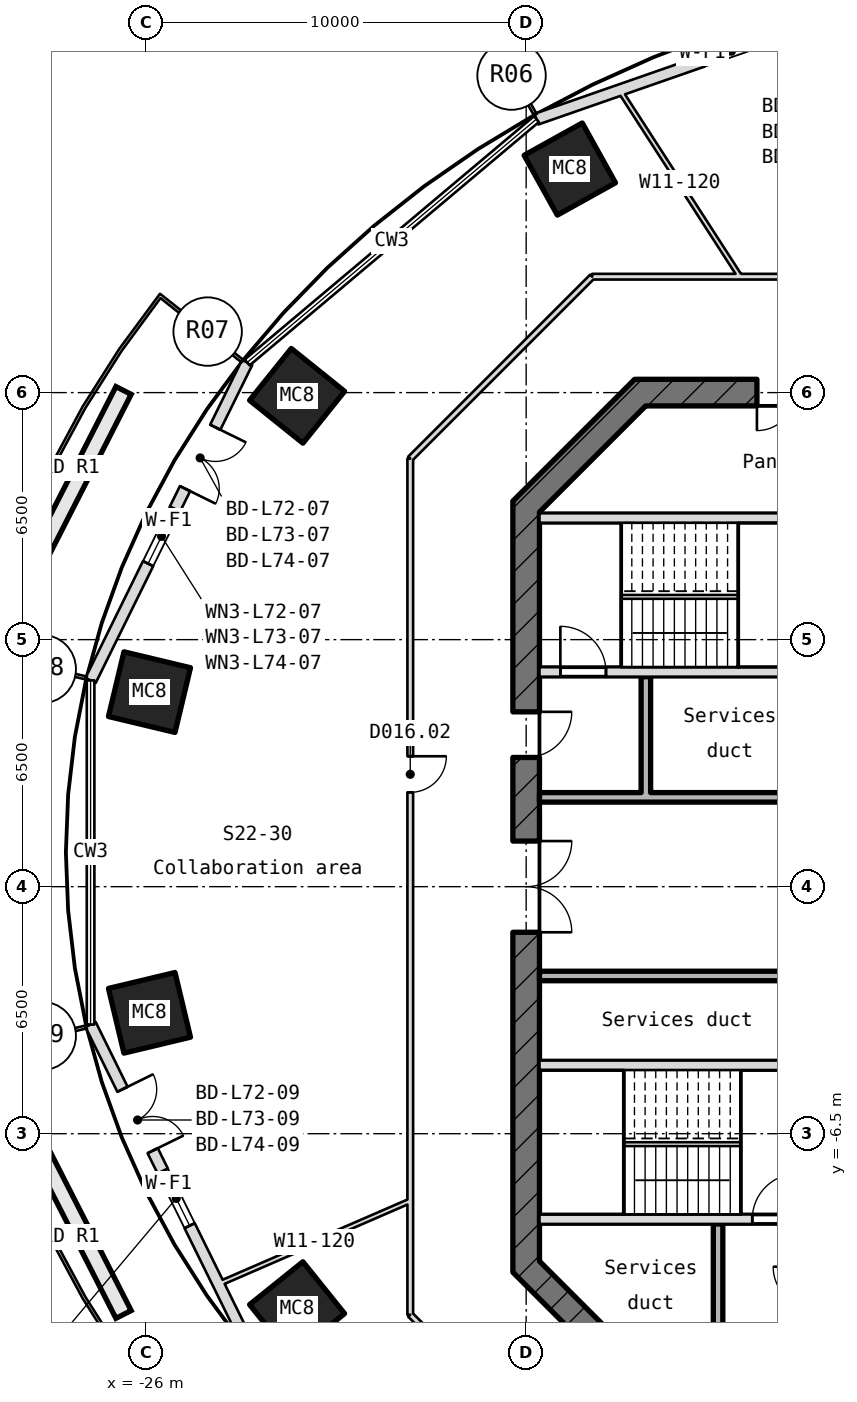
"""IFC4 building model, lengths in metres.
Left out: names, types, materials, properties, quantities, classifications, styles, units other than length and angle.
Written with IfcOpenShell. Run it as: python <this file> out.ifc"""

import sys

from ifc_helpers import new_model, si_unit, direction, frame, frame_2d, origin, origin_2d, place, context, subcontext, project, spatial, rectangle, hollow_rectangle, extrude, element, fill, save


model = new_model("IFC4")
c1 = context("Model", 3, precision=1e-05, world=origin(), true_north=direction((0.0, 1.0)))
c2 = subcontext(c1, "Body", "Model", "MODEL_VIEW")
j1 = project(units=[si_unit("LENGTHUNIT", "METRE"), si_unit("PLANEANGLEUNIT", "RADIAN")], contexts=[c1])
p1 = place(None, origin())
s1 = spatial("IfcSite", under=j1, at=p1, CompositionType="ELEMENT")
p2 = place(p1, origin())
s2 = spatial("IfcBuilding", under=s1, at=p2, CompositionType="ELEMENT")
p3 = place(p2, frame((0.0, 0.0, 321.85)))
s3 = spatial("IfcBuildingStorey", under=s2, at=p3, CompositionType="ELEMENT", Elevation=321.85)
for number, where, z_axis, x_axis in (
    (1, (-14.852, 18.882, -0.18), (0.0, 0.0, 1.0), (0.874, 0.486, 0.0)),
    (2, (-22.028, 12.915, -0.18), (0.0, 0.0, 1.0), (0.626, 0.779, 0.0)),
    (3, (-25.912, 5.119, -0.18), (0.0, 0.0, 1.0), (0.233, 0.973, 0.0)),
    (4, (-25.912, -3.319, -0.18), (0.0, 0.0, 1.0), (-0.233, 0.973, 0.0)),
    (5, (-22.028, -11.115, -0.18), (0.0, 0.0, 1.0), (-0.626, 0.779, 0.0)),
):
    element("IfcColumn", number, at=place(p3, frame(where, z_axis=z_axis, x_axis=x_axis)), inside=s3, PredefinedType="COLUMN", context=c2, shape_type="SweptSolid", body=[
        extrude(hollow_rectangle(XDim=1.75, YDim=1.8, WallThickness=0.055, at=origin_2d()), origin(), (0.0, 0.0, 1.0), 4.15),
    ])
p4 = place(p3, frame((-5.783, 23.661, 0.0), z_axis=(0.0, 0.0, 1.0), x_axis=(-0.944327184146, -0.329007855959, 0.0)))
e6 = element("IfcWall", 6, at=p4, inside=s3, PredefinedType="SOLIDWALL", context=c2, shape_type="SweptSolid", body=[
    extrude(rectangle(XDim=10.533, YDim=0.3, at=frame_2d((5.266, 0.0))), origin(), (0.0, 0.0, 1.0), 3.97),
])
p5 = place(p4, frame((1.9, 0.0, 0.0)))
e7 = element("IfcOpeningElement", 7, at=p5, cuts=e6, PredefinedType="OPENING", context=c2, shape_type="SweptSolid", body=[
    extrude(rectangle(XDim=1.8, YDim=2.4, at=frame_2d((0.9, 1.2))), frame((0.0, 0.16, 0.0), z_axis=(0.0, -1.0, 0.0), x_axis=(1.0, 0.0, 0.0)), (0.0, 0.0, 1.0), 0.32),
])
p6 = place(p4, frame((4.3, 0.0, 0.9)))
e8 = element("IfcOpeningElement", 8, at=p6, cuts=e6, PredefinedType="OPENING", context=c2, shape_type="SweptSolid", body=[
    extrude(rectangle(XDim=1.6, YDim=1.5, at=frame_2d((0.8, 0.75))), frame((0.0, 0.16, 0.0), z_axis=(0.0, -1.0, 0.0), x_axis=(1.0, 0.0, 0.0)), (0.0, 0.0, 1.0), 0.32),
])
p7 = place(p3, frame((-23.342, 13.793, 0.0), z_axis=(0.0, 0.0, 1.0), x_axis=(-0.441822778199, -0.897102353505, 0.0)))
e9 = element("IfcWall", 9, at=p7, inside=s3, PredefinedType="SOLIDWALL", context=c2, shape_type="SweptSolid", body=[
    extrude(rectangle(XDim=9.325, YDim=0.3, at=frame_2d((4.663, 0.0))), origin(), (0.0, 0.0, 1.0), 3.97),
])
p8 = place(p7, frame((1.9, 0.0, 0.0)))
e10 = element("IfcOpeningElement", 10, at=p8, cuts=e9, PredefinedType="OPENING", context=c2, shape_type="SweptSolid", body=[
    extrude(rectangle(XDim=1.8, YDim=2.4, at=frame_2d((0.9, 1.2))), frame((0.0, 0.16, 0.0), z_axis=(0.0, -1.0, 0.0), x_axis=(1.0, 0.0, 0.0)), (0.0, 0.0, 1.0), 0.32),
])
p9 = place(p7, frame((4.3, 0.0, 0.9)))
e11 = element("IfcOpeningElement", 11, at=p9, cuts=e9, PredefinedType="OPENING", context=c2, shape_type="SweptSolid", body=[
    extrude(rectangle(XDim=1.6, YDim=1.5, at=frame_2d((0.8, 0.75))), frame((0.0, 0.16, 0.0), z_axis=(0.0, -1.0, 0.0), x_axis=(1.0, 0.0, 0.0)), (0.0, 0.0, 1.0), 0.32),
])
p10 = place(p3, frame((-27.462, -3.627, 0.0), z_axis=(0.0, 0.0, 1.0), x_axis=(0.441822778199, -0.897102353505, 0.0)))
e12 = element("IfcWall", 12, at=p10, inside=s3, PredefinedType="SOLIDWALL", context=c2, shape_type="SweptSolid", body=[
    extrude(rectangle(XDim=9.325, YDim=0.3, at=frame_2d((4.663, 0.0))), origin(), (0.0, 0.0, 1.0), 3.97),
])
p11 = place(p10, frame((1.9, 0.0, 0.0)))
e13 = element("IfcOpeningElement", 13, at=p11, cuts=e12, PredefinedType="OPENING", context=c2, shape_type="SweptSolid", body=[
    extrude(rectangle(XDim=1.8, YDim=2.4, at=frame_2d((0.9, 1.2))), frame((0.0, 0.16, 0.0), z_axis=(0.0, -1.0, 0.0), x_axis=(1.0, 0.0, 0.0)), (0.0, 0.0, 1.0), 0.32),
])
p12 = place(p10, frame((4.3, 0.0, 0.9)))
e14 = element("IfcOpeningElement", 14, at=p12, cuts=e12, PredefinedType="OPENING", context=c2, shape_type="SweptSolid", body=[
    extrude(rectangle(XDim=1.6, YDim=1.5, at=frame_2d((0.8, 0.75))), frame((0.0, 0.16, 0.0), z_axis=(0.0, -1.0, 0.0), x_axis=(1.0, 0.0, 0.0)), (0.0, 0.0, 1.0), 0.32),
])
p13 = place(p3, frame((13.145, 13.0, -0.18), z_axis=(0.0, 0.0, 1.0), x_axis=(-1.0, 0.0, 0.0)))
e15 = element("IfcWall", 15, at=p13, inside=s3, PredefinedType="SHEAR", context=c2, shape_type="SweptSolid", body=[
    extrude(rectangle(XDim=26.29, YDim=0.7, at=frame_2d((13.145, 0.0))), origin(), (0.0, 0.0, 1.0), 4.15),
])
p14 = place(p13, frame((22.073, 0.0, 0.18)))
e16 = element("IfcOpeningElement", 16, at=p14, cuts=e15, PredefinedType="OPENING", context=c2, shape_type="SweptSolid", body=[
    extrude(rectangle(XDim=1.0, YDim=2.1, at=frame_2d((0.5, 1.05))), frame((0.0, 0.36, 0.0), z_axis=(0.0, -1.0, 0.0), x_axis=(1.0, 0.0, 0.0)), (0.0, 0.0, 1.0), 0.72),
])
p15 = place(p13, frame((15.395, 0.0, 0.18)))
e17 = element("IfcOpeningElement", 17, at=p15, cuts=e15, PredefinedType="OPENING", context=c2, shape_type="SweptSolid", body=[
    extrude(rectangle(XDim=1.0, YDim=2.1, at=frame_2d((0.5, 1.05))), frame((0.0, 0.36, 0.0), z_axis=(0.0, -1.0, 0.0), x_axis=(1.0, 0.0, 0.0)), (0.0, 0.0, 1.0), 0.72),
])
p16 = place(p13, frame((7.895, 0.0, 0.18)))
e18 = element("IfcOpeningElement", 18, at=p16, cuts=e15, PredefinedType="OPENING", context=c2, shape_type="SweptSolid", body=[
    extrude(rectangle(XDim=1.0, YDim=2.1, at=frame_2d((0.5, 1.05))), frame((0.0, 0.36, 0.0), z_axis=(0.0, -1.0, 0.0), x_axis=(1.0, 0.0, 0.0)), (0.0, 0.0, 1.0), 0.72),
])
p17 = place(p13, frame((2.4, 0.0, 0.18)))
e19 = element("IfcOpeningElement", 19, at=p17, cuts=e15, PredefinedType="OPENING", context=c2, shape_type="SweptSolid", body=[
    extrude(rectangle(XDim=1.0, YDim=2.1, at=frame_2d((0.5, 1.05))), frame((0.0, 0.36, 0.0), z_axis=(0.0, -1.0, 0.0), x_axis=(1.0, 0.0, 0.0)), (0.0, 0.0, 1.0), 0.72),
])
p18 = place(p3, frame((-12.897, 13.103, -0.18), z_axis=(0.0, 0.0, 1.0), x_axis=(-0.707106781187, -0.707106781187, 0.0)))
e20 = element("IfcWall", 20, at=p18, inside=s3, PredefinedType="SHEAR", context=c2, shape_type="SweptSolid", body=[
    extrude(rectangle(XDim=4.533, YDim=0.7, at=frame_2d((2.266, 0.0))), origin(), (0.0, 0.0, 1.0), 4.15),
])
p19 = place(p3, frame((-16.0, 10.145, -0.18), z_axis=(0.0, 0.0, 1.0), x_axis=(0.0, -1.0, 0.0)))
e21 = element("IfcWall", 21, at=p19, inside=s3, PredefinedType="SHEAR", context=c2, shape_type="SweptSolid", body=[
    extrude(rectangle(XDim=20.29, YDim=0.7, at=frame_2d((10.145, 0.0))), origin(), (0.0, 0.0, 1.0), 4.15),
])
p20 = place(p19, frame((8.945, 0.0, 0.18)))
e22 = element("IfcOpeningElement", 22, at=p20, cuts=e21, PredefinedType="OPENING", context=c2, shape_type="SweptSolid", body=[
    extrude(rectangle(XDim=2.4, YDim=2.1, at=frame_2d((1.2, 1.05))), frame((0.0, 0.36, 0.0), z_axis=(0.0, -1.0, 0.0), x_axis=(1.0, 0.0, 0.0)), (0.0, 0.0, 1.0), 0.72),
])
p21 = place(p19, frame((5.545, 0.0, 0.18)))
e23 = element("IfcOpeningElement", 23, at=p21, cuts=e21, PredefinedType="OPENING", context=c2, shape_type="SweptSolid", body=[
    extrude(rectangle(XDim=1.2, YDim=2.1, at=frame_2d((0.6, 1.05))), frame((0.0, 0.36, 0.0), z_axis=(0.0, -1.0, 0.0), x_axis=(1.0, 0.0, 0.0)), (0.0, 0.0, 1.0), 0.72),
])
p22 = place(p3, frame((-16.103, -9.897, -0.18), z_axis=(0.0, 0.0, 1.0), x_axis=(0.707106781187, -0.707106781187, 0.0)))
e24 = element("IfcWall", 24, at=p22, inside=s3, PredefinedType="SHEAR", context=c2, shape_type="SweptSolid", body=[
    extrude(rectangle(XDim=4.533, YDim=0.7, at=frame_2d((2.266, 0.0))), origin(), (0.0, 0.0, 1.0), 4.15),
])
p23 = place(p3, frame((-15.65, -8.75, -0.18), z_axis=(0.0, 0.0, 1.0), x_axis=(1.0, 0.0, 0.0)))
e25 = element("IfcWall", 25, at=p23, inside=s3, PredefinedType="SHEAR", context=c2, shape_type="SweptSolid", body=[
    extrude(rectangle(XDim=7.1, YDim=0.25, at=frame_2d((3.55, 0.0))), origin(), (0.0, 0.0, 1.0), 4.15),
])
p24 = place(p23, frame((5.6, 0.0, 0.18)))
e26 = element("IfcOpeningElement", 26, at=p24, cuts=e25, PredefinedType="OPENING", context=c2, shape_type="SweptSolid", body=[
    extrude(rectangle(XDim=1.2, YDim=2.1, at=frame_2d((0.6, 1.05))), frame((0.0, 0.135, 0.0), z_axis=(0.0, -1.0, 0.0), x_axis=(1.0, 0.0, 0.0)), (0.0, 0.0, 1.0), 0.27),
])
p25 = place(p3, frame((-15.65, -4.7, -0.18), z_axis=(0.0, 0.0, 1.0), x_axis=(1.0, 0.0, 0.0)))
e27 = element("IfcWall", 27, at=p25, inside=s3, PredefinedType="SHEAR", context=c2, shape_type="SweptSolid", body=[
    extrude(rectangle(XDim=7.1, YDim=0.25, at=frame_2d((3.55, 0.0))), origin(), (0.0, 0.0, 1.0), 4.15),
])
for number, where, z_axis, x_axis in (
    (28, (-15.65, -2.35, 0.0), (0.0, 0.0, 1.0), (1.0, 0.0, 0.0)),
    (29, (-15.65, 2.35, 0.0), (0.0, 0.0, 1.0), (1.0, 0.0, 0.0)),
):
    element("IfcWall", number, at=place(p3, frame(where, z_axis=z_axis, x_axis=x_axis)), inside=s3, PredefinedType="STANDARD", context=c2, shape_type="SweptSolid", body=[
        extrude(rectangle(XDim=7.25, YDim=0.25, at=frame_2d((3.625, 0.0))), origin(), (0.0, 0.0, 1.0), 3.97),
    ])
p26 = place(p3, frame((-15.65, 5.65, -0.18), z_axis=(0.0, 0.0, 1.0), x_axis=(1.0, 0.0, 0.0)))
e30 = element("IfcWall", 30, at=p26, inside=s3, PredefinedType="SHEAR", context=c2, shape_type="SweptSolid", body=[
    extrude(rectangle(XDim=7.1, YDim=0.25, at=frame_2d((3.55, 0.0))), origin(), (0.0, 0.0, 1.0), 4.15),
])
p27 = place(p26, frame((0.55, 0.0, 0.18)))
e31 = element("IfcOpeningElement", 31, at=p27, cuts=e30, PredefinedType="OPENING", context=c2, shape_type="SweptSolid", body=[
    extrude(rectangle(XDim=1.2, YDim=2.1, at=frame_2d((0.6, 1.05))), frame((0.0, 0.135, 0.0), z_axis=(0.0, -1.0, 0.0), x_axis=(1.0, 0.0, 0.0)), (0.0, 0.0, 1.0), 0.27),
])
p28 = place(p3, frame((-15.65, 9.7, -0.18), z_axis=(0.0, 0.0, 1.0), x_axis=(1.0, 0.0, 0.0)))
e32 = element("IfcWall", 32, at=p28, inside=s3, PredefinedType="SHEAR", context=c2, shape_type="SweptSolid", body=[
    extrude(rectangle(XDim=7.1, YDim=0.25, at=frame_2d((3.55, 0.0))), origin(), (0.0, 0.0, 1.0), 4.15),
])
p29 = place(p3, frame((-12.85, 2.475, 0.0), z_axis=(0.0, 0.0, 1.0), x_axis=(0.0, 1.0, 0.0)))
e33 = element("IfcWall", 33, at=p29, inside=s3, PredefinedType="STANDARD", context=c2, shape_type="SweptSolid", body=[
    extrude(rectangle(XDim=3.05, YDim=0.25, at=frame_2d((1.525, 0.0))), origin(), (0.0, 0.0, 1.0), 3.97),
])
p30 = place(p3, frame((-10.95, -12.65, 0.0), z_axis=(0.0, 0.0, 1.0), x_axis=(0.0, 1.0, 0.0)))
e34 = element("IfcWall", 34, at=p30, inside=s3, PredefinedType="STANDARD", context=c2, shape_type="SweptSolid", body=[
    extrude(rectangle(XDim=3.775, YDim=0.25, at=frame_2d((1.887, 0.0))), origin(), (0.0, 0.0, 1.0), 3.97),
])
p31 = place(p3, frame((-19.05, -11.263, 0.0), z_axis=(0.0, 0.0, 1.0), x_axis=(0.0, 1.0, 0.0)))
e35 = element("IfcWall", 35, at=p31, inside=s3, PredefinedType="PARTITIONING", context=c2, shape_type="SweptSolid", body=[
    extrude(rectangle(XDim=22.527, YDim=0.15, at=frame_2d((11.263, 0.0))), origin(), (0.0, 0.0, 1.0), 3.97),
])
p32 = place(p31, frame((13.745, 0.0, 0.0)))
e36 = element("IfcOpeningElement", 36, at=p32, cuts=e35, PredefinedType="OPENING", context=c2, shape_type="SweptSolid", body=[
    extrude(rectangle(XDim=0.95, YDim=2.1, at=frame_2d((0.475, 1.05))), frame((0.0, 0.085, 0.0), z_axis=(0.0, -1.0, 0.0), x_axis=(1.0, 0.0, 0.0)), (0.0, 0.0, 1.0), 0.17),
])
p33 = place(p3, frame((-19.05, -8.266, 0.0), z_axis=(0.0, 0.0, 1.0), x_axis=(-0.917352652967, -0.398075508031, 0.0)))
e37 = element("IfcWall", 37, at=p33, inside=s3, PredefinedType="PARTITIONING", context=c2, shape_type="SweptSolid", body=[
    extrude(rectangle(XDim=5.503, YDim=0.12, at=frame_2d((2.751, 0.0))), origin(), (0.0, 0.0, 1.0), 3.97),
])
p34 = place(p3, frame((-19.05, 11.263, 0.0), z_axis=(0.0, 0.0, 1.0), x_axis=(0.707106781187, 0.707106781187, 0.0)))
e38 = element("IfcWall", 38, at=p34, inside=s3, PredefinedType="PARTITIONING", context=c2, shape_type="SweptSolid", body=[
    extrude(rectangle(XDim=6.769, YDim=0.15, at=frame_2d((3.385, 0.0))), origin(), (0.0, 0.0, 1.0), 3.97),
])
p35 = place(p3, frame((-14.263, -16.05, 0.0), z_axis=(0.0, 0.0, 1.0), x_axis=(-0.707106781187, 0.707106781187, 0.0)))
e39 = element("IfcWall", 39, at=p35, inside=s3, PredefinedType="PARTITIONING", context=c2, shape_type="SweptSolid", body=[
    extrude(rectangle(XDim=6.769, YDim=0.15, at=frame_2d((3.385, 0.0))), origin(), (0.0, 0.0, 1.0), 3.97),
])
p36 = place(p35, frame((2.91, 0.0, 0.0)))
e40 = element("IfcOpeningElement", 40, at=p36, cuts=e39, PredefinedType="OPENING", context=c2, shape_type="SweptSolid", body=[
    extrude(rectangle(XDim=0.95, YDim=2.1, at=frame_2d((0.475, 1.05))), frame((0.0, 0.085, 0.0), z_axis=(0.0, -1.0, 0.0), x_axis=(1.0, 0.0, 0.0)), (0.0, 0.0, 1.0), 0.17),
])
p37 = place(p3, frame((-14.263, 16.05, 0.0), z_axis=(0.0, 0.0, 1.0), x_axis=(1.0, 0.0, 0.0)))
e41 = element("IfcWall", 41, at=p37, inside=s3, PredefinedType="PARTITIONING", context=c2, shape_type="SweptSolid", body=[
    extrude(rectangle(XDim=28.527, YDim=0.15, at=frame_2d((14.263, 0.0))), origin(), (0.0, 0.0, 1.0), 3.97),
])
p38 = place(p37, frame((23.008, 0.0, 0.0)))
e42 = element("IfcOpeningElement", 42, at=p38, cuts=e41, PredefinedType="OPENING", context=c2, shape_type="SweptSolid", body=[
    extrude(rectangle(XDim=1.8, YDim=2.1, at=frame_2d((0.9, 1.05))), frame((0.0, 0.085, 0.0), z_axis=(0.0, -1.0, 0.0), x_axis=(1.0, 0.0, 0.0)), (0.0, 0.0, 1.0), 0.17),
])
p39 = place(p37, frame((11.116, 0.0, 0.0)))
e43 = element("IfcOpeningElement", 43, at=p39, cuts=e41, PredefinedType="OPENING", context=c2, shape_type="SweptSolid", body=[
    extrude(rectangle(XDim=0.95, YDim=2.1, at=frame_2d((0.475, 1.05))), frame((0.0, 0.085, 0.0), z_axis=(0.0, -1.0, 0.0), x_axis=(1.0, 0.0, 0.0)), (0.0, 0.0, 1.0), 0.17),
])
p40 = place(p3, frame((-10.371, 16.05, 0.0), z_axis=(0.0, 0.0, 1.0), x_axis=(-0.542726268586, 0.839909636441, 0.0)))
e44 = element("IfcWall", 44, at=p40, inside=s3, PredefinedType="PARTITIONING", context=c2, shape_type="SweptSolid", body=[
    extrude(rectangle(XDim=5.844, YDim=0.12, at=frame_2d((2.922, 0.0))), origin(), (0.0, 0.0, 1.0), 3.97),
])
p41 = place(p6, origin())
e45 = element("IfcWindow", 45, at=p41, inside=s3, PartitioningType="SINGLE_PANEL", PredefinedType="WINDOW", context=c2, shape_type="SweptSolid", body=[
    extrude(rectangle(XDim=1.6, YDim=1.5, at=frame_2d((0.8, 0.75))), frame((0.0, 0.03, 0.0), z_axis=(0.0, -1.0, 0.0), x_axis=(1.0, 0.0, 0.0)), (0.0, 0.0, 1.0), 0.06),
])
fill(e8, e45)
p42 = place(p8, origin())
e46 = element("IfcDoor", 46, at=p42, inside=s3, OperationType="SINGLE_SWING_LEFT", PredefinedType="DOOR", context=c2, shape_type="SweptSolid", body=[
    extrude(rectangle(XDim=1.8, YDim=2.4, at=frame_2d((0.9, 1.2))), frame((0.0, 0.025, 0.0), z_axis=(0.0, -1.0, 0.0), x_axis=(1.0, 0.0, 0.0)), (0.0, 0.0, 1.0), 0.05),
])
fill(e10, e46)
p43 = place(p9, origin())
e47 = element("IfcWindow", 47, at=p43, inside=s3, PartitioningType="SINGLE_PANEL", PredefinedType="WINDOW", context=c2, shape_type="SweptSolid", body=[
    extrude(rectangle(XDim=1.6, YDim=1.5, at=frame_2d((0.8, 0.75))), frame((0.0, 0.03, 0.0), z_axis=(0.0, -1.0, 0.0), x_axis=(1.0, 0.0, 0.0)), (0.0, 0.0, 1.0), 0.06),
])
fill(e11, e47)
p44 = place(p11, origin())
e48 = element("IfcDoor", 48, at=p44, inside=s3, OperationType="SINGLE_SWING_LEFT", PredefinedType="DOOR", context=c2, shape_type="SweptSolid", body=[
    extrude(rectangle(XDim=1.8, YDim=2.4, at=frame_2d((0.9, 1.2))), frame((0.0, 0.025, 0.0), z_axis=(0.0, -1.0, 0.0), x_axis=(1.0, 0.0, 0.0)), (0.0, 0.0, 1.0), 0.05),
])
fill(e13, e48)
p45 = place(p12, origin())
e49 = element("IfcWindow", 49, at=p45, inside=s3, PartitioningType="SINGLE_PANEL", PredefinedType="WINDOW", context=c2, shape_type="SweptSolid", body=[
    extrude(rectangle(XDim=1.6, YDim=1.5, at=frame_2d((0.8, 0.75))), frame((0.0, 0.03, 0.0), z_axis=(0.0, -1.0, 0.0), x_axis=(1.0, 0.0, 0.0)), (0.0, 0.0, 1.0), 0.06),
])
fill(e14, e49)
p46 = place(p27, origin())
e50 = element("IfcDoor", 50, at=p46, inside=s3, OperationType="SINGLE_SWING_RIGHT", PredefinedType="DOOR", context=c2, shape_type="SweptSolid", body=[
    extrude(rectangle(XDim=1.2, YDim=2.1, at=frame_2d((0.6, 1.05))), frame((0.0, 0.025, 0.0), z_axis=(0.0, -1.0, 0.0), x_axis=(1.0, 0.0, 0.0)), (0.0, 0.0, 1.0), 0.05),
])
fill(e31, e50)
p47 = place(p24, origin())
e51 = element("IfcDoor", 51, at=p47, inside=s3, OperationType="SINGLE_SWING_RIGHT", PredefinedType="DOOR", context=c2, shape_type="SweptSolid", body=[
    extrude(rectangle(XDim=1.2, YDim=2.1, at=frame_2d((0.6, 1.05))), frame((0.0, 0.025, 0.0), z_axis=(0.0, -1.0, 0.0), x_axis=(1.0, 0.0, 0.0)), (0.0, 0.0, 1.0), 0.05),
])
fill(e26, e51)
p48 = place(p20, origin())
e52 = element("IfcDoor", 52, at=p48, inside=s3, OperationType="DOUBLE_DOOR_SINGLE_SWING", PredefinedType="DOOR", context=c2, shape_type="SweptSolid", body=[
    extrude(rectangle(XDim=2.4, YDim=2.1, at=frame_2d((1.2, 1.05))), frame((0.0, 0.025, 0.0), z_axis=(0.0, -1.0, 0.0), x_axis=(1.0, 0.0, 0.0)), (0.0, 0.0, 1.0), 0.05),
])
fill(e22, e52)
p49 = place(p21, origin())
e53 = element("IfcDoor", 53, at=p49, inside=s3, OperationType="SINGLE_SWING_RIGHT", PredefinedType="DOOR", context=c2, shape_type="SweptSolid", body=[
    extrude(rectangle(XDim=1.2, YDim=2.1, at=frame_2d((0.6, 1.05))), frame((0.0, 0.025, 0.0), z_axis=(0.0, -1.0, 0.0), x_axis=(1.0, 0.0, 0.0)), (0.0, 0.0, 1.0), 0.05),
])
fill(e23, e53)
p50 = place(p14, origin())
e54 = element("IfcDoor", 54, at=p50, inside=s3, OperationType="SINGLE_SWING_RIGHT", PredefinedType="DOOR", context=c2, shape_type="SweptSolid", body=[
    extrude(rectangle(XDim=1.0, YDim=2.1, at=frame_2d((0.5, 1.05))), frame((0.0, 0.025, 0.0), z_axis=(0.0, -1.0, 0.0), x_axis=(1.0, 0.0, 0.0)), (0.0, 0.0, 1.0), 0.05),
])
fill(e16, e54)
p51 = place(p32, frame((0.95, 0.0, 0.0), z_axis=(0.0, 0.0, 1.0), x_axis=(-1.0, 0.0, 0.0)))
e55 = element("IfcDoor", 55, at=p51, inside=s3, OperationType="SINGLE_SWING_LEFT", PredefinedType="DOOR", context=c2, shape_type="SweptSolid", body=[
    extrude(rectangle(XDim=0.95, YDim=2.1, at=frame_2d((0.475, 1.05))), frame((0.0, 0.025, 0.0), z_axis=(0.0, -1.0, 0.0), x_axis=(1.0, 0.0, 0.0)), (0.0, 0.0, 1.0), 0.05),
])
fill(e36, e55)
save(model, sys.argv[1])
